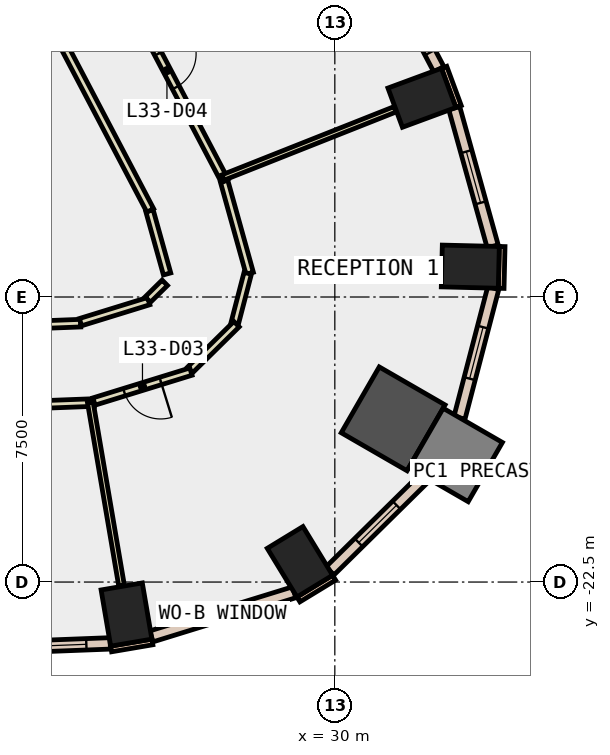
"""IFC4 building model, lengths in metres.
Left out: names, types, materials, properties, quantities, classifications, styles, units other than length and angle.
Written with IfcOpenShell. Run it as: python <this file> out.ifc"""

import sys

from ifc_helpers import new_model, si_unit, direction, frame, frame_2d, origin, origin_2d, place, context, subcontext, project, spatial, rectangle, extrude, element, fill, save


model = new_model("IFC4")
c1 = context("Model", 3, precision=1e-05, world=origin(), true_north=direction((0.0, 1.0)))
c2 = subcontext(c1, "Body", "Model", "MODEL_VIEW")
j1 = project(units=[si_unit("LENGTHUNIT", "METRE"), si_unit("PLANEANGLEUNIT", "RADIAN")], contexts=[c1])
p1 = place(None, origin())
s1 = spatial("IfcSite", under=j1, at=p1, CompositionType="ELEMENT")
p2 = place(p1, origin())
s2 = spatial("IfcBuilding", under=s1, at=p2, CompositionType="ELEMENT")
p3 = place(p2, frame((0.0, 0.0, 150.8)))
s3 = spatial("IfcBuildingStorey", under=s2, at=p3, CompositionType="ELEMENT", Elevation=150.8)
for number, where, z_axis, x_axis in (
    (1, (24.518, -23.355, -0.4), (0.0, 0.0, 1.0), (0.986, 0.168, 0.0)),
    (2, (29.082, -21.967, -0.4), (0.0, 0.0, 1.0), (0.854, 0.521, 0.0)),
):
    element("IfcColumn", number, at=place(p3, frame(where, z_axis=z_axis, x_axis=x_axis)), inside=s3, PredefinedType="COLUMN", context=c2, shape_type="SweptSolid", body=[
        extrude(rectangle(XDim=1.1, YDim=1.5, at=origin_2d()), origin(), (0.0, 0.0, 1.0), 4.2),
    ])
p4 = place(p3, frame((31.535, -18.206, -0.4), z_axis=(0.0, 0.0, 1.0), x_axis=(-0.866025403784, 0.5, 0.0)))
e3 = element("IfcColumn", 3, at=p4, inside=s3, PredefinedType="COLUMN", context=c2, shape_type="SweptSolid", body=[
    extrude(rectangle(XDim=2.0, YDim=2.0, at=origin_2d()), origin(), (0.0, 0.0, 1.0), 4.2),
])
for number, where, z_axis, x_axis in (
    (4, (33.565, -14.202, -0.4), (0.0, 0.0, 1.0), (0.024, 1.0, 0.0)),
    (5, (32.292, -9.758, -0.4), (0.0, 0.0, 1.0), (-0.347, 0.938, 0.0)),
):
    element("IfcColumn", number, at=place(p3, frame(where, z_axis=z_axis, x_axis=x_axis)), inside=s3, PredefinedType="COLUMN", context=c2, shape_type="SweptSolid", body=[
        extrude(rectangle(XDim=1.1, YDim=1.5, at=origin_2d()), origin(), (0.0, 0.0, 1.0), 4.2),
    ])
p5 = place(p3, frame((33.18, -19.156, -0.4), z_axis=(0.0, 0.0, 1.0), x_axis=(-0.866025403784, 0.5, 0.0)))
e6 = element("IfcColumn", 6, at=p5, inside=s3, PredefinedType="COLUMN", context=c2, shape_type="SweptSolid", body=[
    extrude(rectangle(XDim=1.8, YDim=1.8, at=origin_2d()), origin(), (0.0, 0.0, 1.0), 4.2),
])
p6 = place(p3, frame((33.256, -9.988, 0.0), z_axis=(0.0, 0.0, 1.0), x_axis=(-0.346425160624, 0.93807761304, 0.0)))
e7 = element("IfcWall", 7, at=p6, inside=s3, PredefinedType="STANDARD", context=c2, shape_type="SweptSolid", body=[
    extrude(rectangle(XDim=1.1, YDim=0.15, at=frame_2d((0.55, 0.0))), origin(), (0.0, 0.0, 1.0), 3.8),
])
p7 = place(p3, frame((24.114, -24.261, 0.0), z_axis=(0.0, 0.0, 1.0), x_axis=(0.985763338892, 0.168138751323, 0.0)))
e8 = element("IfcWall", 8, at=p7, inside=s3, PredefinedType="STANDARD", context=c2, shape_type="SweptSolid", body=[
    extrude(rectangle(XDim=1.101, YDim=0.15, at=frame_2d((0.55, 0.0))), origin(), (0.0, 0.0, 1.0), 3.8),
])
p8 = place(p3, frame((29.042, -22.957, 0.0), z_axis=(0.0, 0.0, 1.0), x_axis=(0.854005542721, 0.520263907071, 0.0)))
e9 = element("IfcWall", 9, at=p8, inside=s3, PredefinedType="STANDARD", context=c2, shape_type="SweptSolid", body=[
    extrude(rectangle(XDim=1.099, YDim=0.15, at=frame_2d((0.55, 0.0))), origin(), (0.0, 0.0, 1.0), 3.8),
])
p9 = place(p3, frame((34.377, -14.772, 0.0), z_axis=(0.0, 0.0, 1.0), x_axis=(0.023744690764, 0.999718055084, 0.0)))
e10 = element("IfcWall", 10, at=p9, inside=s3, PredefinedType="STANDARD", context=c2, shape_type="SweptSolid", body=[
    extrude(rectangle(XDim=1.1, YDim=0.15, at=frame_2d((0.55, 0.0))), origin(), (0.0, 0.0, 1.0), 3.8),
])
p10 = place(p3, frame((16.778, -24.395, 0.0), z_axis=(0.0, 0.0, 1.0), x_axis=(0.999262356942, 0.038402369711, 0.0)))
e11 = element("IfcWall", 11, at=p10, inside=s3, PredefinedType="STANDARD", context=c2, shape_type="SweptSolid", body=[
    extrude(rectangle(XDim=7.317, YDim=0.3, at=frame_2d((3.659, 0.0))), origin(), (0.0, 0.0, 1.0), 3.8),
])
p11 = place(p10, frame((0.629, 0.0, 0.9)))
e12 = element("IfcOpeningElement", 12, at=p11, cuts=e11, PredefinedType="OPENING", context=c2, shape_type="SweptSolid", body=[
    extrude(rectangle(XDim=2.4, YDim=2.6, at=frame_2d((1.2, 1.3))), frame((0.0, 0.16, 0.0), z_axis=(0.0, -1.0, 0.0), x_axis=(1.0, 0.0, 0.0)), (0.0, 0.0, 1.0), 0.32),
])
p12 = place(p10, frame((4.288, 0.0, 0.9)))
e13 = element("IfcOpeningElement", 13, at=p12, cuts=e11, PredefinedType="OPENING", context=c2, shape_type="SweptSolid", body=[
    extrude(rectangle(XDim=2.4, YDim=2.6, at=frame_2d((1.2, 1.3))), frame((0.0, 0.16, 0.0), z_axis=(0.0, -1.0, 0.0), x_axis=(1.0, 0.0, 0.0)), (0.0, 0.0, 1.0), 0.32),
])
p13 = place(p3, frame((25.173, -23.93, 0.0), z_axis=(0.0, 0.0, 1.0), x_axis=(0.955473661147, 0.295076401723, 0.0)))
e14 = element("IfcWall", 14, at=p13, inside=s3, PredefinedType="STANDARD", context=c2, shape_type="SweptSolid", body=[
    extrude(rectangle(XDim=3.931, YDim=0.3, at=frame_2d((1.965, 0.0))), origin(), (0.0, 0.0, 1.0), 3.8),
])
p14 = place(p13, frame((1.266, 0.0, 0.9)))
e15 = element("IfcOpeningElement", 15, at=p14, cuts=e14, PredefinedType="OPENING", context=c2, shape_type="SweptSolid", body=[
    extrude(rectangle(XDim=1.4, YDim=2.6, at=frame_2d((0.7, 1.3))), frame((0.0, 0.16, 0.0), z_axis=(0.0, -1.0, 0.0), x_axis=(1.0, 0.0, 0.0)), (0.0, 0.0, 1.0), 0.32),
])
p15 = place(p3, frame((29.872, -22.207, 0.0), z_axis=(0.0, 0.0, 1.0), x_axis=(0.712043314899, 0.702135540838, 0.0)))
e16 = element("IfcWall", 16, at=p15, inside=s3, PredefinedType="STANDARD", context=c2, shape_type="SweptSolid", body=[
    extrude(rectangle(XDim=3.524, YDim=0.3, at=frame_2d((1.762, 0.0))), origin(), (0.0, 0.0, 1.0), 3.8),
])
p16 = place(p15, frame((1.062, 0.0, 0.9)))
e17 = element("IfcOpeningElement", 17, at=p16, cuts=e16, PredefinedType="OPENING", context=c2, shape_type="SweptSolid", body=[
    extrude(rectangle(XDim=1.4, YDim=2.6, at=frame_2d((0.7, 1.3))), frame((0.0, 0.16, 0.0), z_axis=(0.0, -1.0, 0.0), x_axis=(1.0, 0.0, 0.0)), (0.0, 0.0, 1.0), 0.32),
])
p17 = place(p3, frame((33.28, -18.176, 0.0), z_axis=(0.0, 0.0, 1.0), x_axis=(0.252255494168, 0.967660666588, 0.0)))
e18 = element("IfcWall", 18, at=p17, inside=s3, PredefinedType="STANDARD", context=c2, shape_type="SweptSolid", body=[
    extrude(rectangle(XDim=3.524, YDim=0.3, at=frame_2d((1.762, 0.0))), origin(), (0.0, 0.0, 1.0), 3.8),
])
p18 = place(p17, frame((1.062, 0.0, 0.9)))
e19 = element("IfcOpeningElement", 19, at=p18, cuts=e18, PredefinedType="OPENING", context=c2, shape_type="SweptSolid", body=[
    extrude(rectangle(XDim=1.4, YDim=2.6, at=frame_2d((0.7, 1.3))), frame((0.0, 0.16, 0.0), z_axis=(0.0, -1.0, 0.0), x_axis=(1.0, 0.0, 0.0)), (0.0, 0.0, 1.0), 0.32),
])
p19 = place(p3, frame((34.154, -13.667, 0.0), z_axis=(0.0, 0.0, 1.0), x_axis=(-0.26799398221, 0.963420585985, 0.0)))
e20 = element("IfcWall", 20, at=p19, inside=s3, PredefinedType="STANDARD", context=c2, shape_type="SweptSolid", body=[
    extrude(rectangle(XDim=3.776, YDim=0.3, at=frame_2d((1.888, 0.0))), origin(), (0.0, 0.0, 1.0), 3.8),
])
p20 = place(p19, frame((1.188, 0.0, 0.9)))
e21 = element("IfcOpeningElement", 21, at=p20, cuts=e20, PredefinedType="OPENING", context=c2, shape_type="SweptSolid", body=[
    extrude(rectangle(XDim=1.4, YDim=2.6, at=frame_2d((0.7, 1.3))), frame((0.0, 0.16, 0.0), z_axis=(0.0, -1.0, 0.0), x_axis=(1.0, 0.0, 0.0)), (0.0, 0.0, 1.0), 0.32),
])
p21 = place(p3, frame((32.737, -9.008, 0.0), z_axis=(0.0, 0.0, 1.0), x_axis=(-0.465104650407, 0.885255705528, 0.0)))
e22 = element("IfcWall", 22, at=p21, inside=s3, PredefinedType="STANDARD", context=c2, shape_type="SweptSolid", body=[
    extrude(rectangle(XDim=5.99, YDim=0.3, at=frame_2d((2.995, 0.0))), origin(), (0.0, 0.0, 1.0), 3.8),
])
p22 = place(p21, frame((0.498, 0.0, 0.9)))
e23 = element("IfcOpeningElement", 23, at=p22, cuts=e22, PredefinedType="OPENING", context=c2, shape_type="SweptSolid", body=[
    extrude(rectangle(XDim=2.0, YDim=2.6, at=frame_2d((1.0, 1.3))), frame((0.0, 0.16, 0.0), z_axis=(0.0, -1.0, 0.0), x_axis=(1.0, 0.0, 0.0)), (0.0, 0.0, 1.0), 0.32),
])
p23 = place(p21, frame((3.493, 0.0, 0.9)))
e24 = element("IfcOpeningElement", 24, at=p23, cuts=e22, PredefinedType="OPENING", context=c2, shape_type="SweptSolid", body=[
    extrude(rectangle(XDim=2.0, YDim=2.6, at=frame_2d((1.0, 1.3))), frame((0.0, 0.16, 0.0), z_axis=(0.0, -1.0, 0.0), x_axis=(1.0, 0.0, 0.0)), (0.0, 0.0, 1.0), 0.32),
])
p24 = place(p3, frame((15.972, -15.97, 0.0), z_axis=(0.0, 0.0, 1.0), x_axis=(0.999262695969, 0.038393546916, 0.0)))
e25 = element("IfcWall", 25, at=p24, inside=s3, PredefinedType="PARTITIONING", context=c2, shape_type="SweptSolid", body=[
    extrude(rectangle(XDim=7.344, YDim=0.2, at=frame_2d((3.672, 0.0))), origin(), (0.0, 0.0, 1.0), 3.8),
])
p25 = place(p3, frame((23.307, -15.662, 0.0), z_axis=(0.0, 0.0, 1.0), x_axis=(0.955548436851, 0.294834164966, 0.0)))
e26 = element("IfcWall", 26, at=p25, inside=s3, PredefinedType="PARTITIONING", context=c2, shape_type="SweptSolid", body=[
    extrude(rectangle(XDim=1.88, YDim=0.2, at=frame_2d((0.94, 0.0))), origin(), (0.0, 0.0, 1.0), 3.8),
])
p26 = place(p3, frame((25.079, -15.067, 0.0), z_axis=(0.0, 0.0, 1.0), x_axis=(0.711758647644, 0.702424108003, 0.0)))
e27 = element("IfcWall", 27, at=p26, inside=s3, PredefinedType="PARTITIONING", context=c2, shape_type="SweptSolid", body=[
    extrude(rectangle(XDim=0.628, YDim=0.2, at=frame_2d((0.314, 0.0))), origin(), (0.0, 0.0, 1.0), 3.8),
])
p27 = place(p3, frame((25.586, -14.393, 0.0), z_axis=(0.0, 0.0, 1.0), x_axis=(-0.268139825244, 0.963380005044, 0.0)))
e28 = element("IfcWall", 28, at=p27, inside=s3, PredefinedType="PARTITIONING", context=c2, shape_type="SweptSolid", body=[
    extrude(rectangle(XDim=1.726, YDim=0.2, at=frame_2d((0.863, 0.0))), origin(), (0.0, 0.0, 1.0), 3.8),
])
p28 = place(p3, frame((25.143, -12.722, 0.0), z_axis=(0.0, 0.0, 1.0), x_axis=(-0.465089990515, 0.885263407536, 0.0)))
e29 = element("IfcWall", 29, at=p28, inside=s3, PredefinedType="PARTITIONING", context=c2, shape_type="SweptSolid", body=[
    extrude(rectangle(XDim=6.24, YDim=0.2, at=frame_2d((3.12, 0.0))), origin(), (0.0, 0.0, 1.0), 3.8),
])
p29 = place(p3, frame((23.667, -17.776, 0.0), z_axis=(0.0, 0.0, 1.0), x_axis=(-0.999264080977, -0.038357482575, 0.0)))
e30 = element("IfcWall", 30, at=p29, inside=s3, PredefinedType="PARTITIONING", context=c2, shape_type="SweptSolid", body=[
    extrude(rectangle(XDim=7.562, YDim=0.2, at=frame_2d((3.781, 0.0))), origin(), (0.0, 0.0, 1.0), 3.8),
])
p30 = place(p29, frame((3.356, 0.0, 0.0)))
e31 = element("IfcOpeningElement", 31, at=p30, cuts=e30, PredefinedType="OPENING", context=c2, shape_type="SweptSolid", body=[
    extrude(rectangle(XDim=1.0, YDim=2.1, at=frame_2d((0.5, 1.05))), frame((0.0, 0.11, 0.0), z_axis=(0.0, -1.0, 0.0), x_axis=(1.0, 0.0, 0.0)), (0.0, 0.0, 1.0), 0.22),
])
p31 = place(p3, frame((27.086, -11.952, 0.0), z_axis=(0.0, 0.0, 1.0), x_axis=(0.267909096687, -0.963444194498, 0.0)))
e32 = element("IfcWall", 32, at=p31, inside=s3, PredefinedType="PARTITIONING", context=c2, shape_type="SweptSolid", body=[
    extrude(rectangle(XDim=2.516, YDim=0.2, at=frame_2d((1.258, 0.0))), origin(), (0.0, 0.0, 1.0), 3.8),
])
p32 = place(p3, frame((27.708, -14.376, 0.0), z_axis=(0.0, 0.0, 1.0), x_axis=(-0.25159336549, -0.967833032316, 0.0)))
e33 = element("IfcWall", 33, at=p32, inside=s3, PredefinedType="PARTITIONING", context=c2, shape_type="SweptSolid", body=[
    extrude(rectangle(XDim=1.356, YDim=0.2, at=frame_2d((0.678, 0.0))), origin(), (0.0, 0.0, 1.0), 3.8),
])
p33 = place(p3, frame((27.413, -15.715, 0.0), z_axis=(0.0, 0.0, 1.0), x_axis=(-0.712339678389, -0.701834868465, 0.0)))
e34 = element("IfcWall", 34, at=p33, inside=s3, PredefinedType="PARTITIONING", context=c2, shape_type="SweptSolid", body=[
    extrude(rectangle(XDim=1.72, YDim=0.2, at=frame_2d((0.86, 0.0))), origin(), (0.0, 0.0, 1.0), 3.8),
])
p34 = place(p3, frame((26.213, -16.963, 0.0), z_axis=(0.0, 0.0, 1.0), x_axis=(-0.955509582123, -0.294960062501, 0.0)))
e35 = element("IfcWall", 35, at=p34, inside=s3, PredefinedType="PARTITIONING", context=c2, shape_type="SweptSolid", body=[
    extrude(rectangle(XDim=2.668, YDim=0.2, at=frame_2d((1.334, 0.0))), origin(), (0.0, 0.0, 1.0), 3.8),
])
p35 = place(p34, frame((0.834, 0.0, 0.0)))
e36 = element("IfcOpeningElement", 36, at=p35, cuts=e35, PredefinedType="OPENING", context=c2, shape_type="SweptSolid", body=[
    extrude(rectangle(XDim=1.0, YDim=2.1, at=frame_2d((0.5, 1.05))), frame((0.0, 0.11, 0.0), z_axis=(0.0, -1.0, 0.0), x_axis=(1.0, 0.0, 0.0)), (0.0, 0.0, 1.0), 0.22),
])
p36 = place(p3, frame((24.059, -6.143, 0.0), z_axis=(0.0, 0.0, 1.0), x_axis=(0.464993808059, -0.885313932154, 0.0)))
e37 = element("IfcWall", 37, at=p36, inside=s3, PredefinedType="PARTITIONING", context=c2, shape_type="SweptSolid", body=[
    extrude(rectangle(XDim=6.552, YDim=0.2, at=frame_2d((3.276, 0.0))), origin(), (0.0, 0.0, 1.0), 3.8),
])
p37 = place(p36, frame((2.776, 0.0, 0.0)))
e38 = element("IfcOpeningElement", 38, at=p37, cuts=e37, PredefinedType="OPENING", context=c2, shape_type="SweptSolid", body=[
    extrude(rectangle(XDim=1.0, YDim=2.1, at=frame_2d((0.5, 1.05))), frame((0.0, 0.11, 0.0), z_axis=(0.0, -1.0, 0.0), x_axis=(1.0, 0.0, 0.0)), (0.0, 0.0, 1.0), 0.22),
])
p38 = place(p3, frame((23.567, -17.779, 0.0), z_axis=(0.0, 0.0, 1.0), x_axis=(0.168027663896, -0.985782280306, 0.0)))
e39 = element("IfcWall", 39, at=p38, inside=s3, PredefinedType="PARTITIONING", context=c2, shape_type="SweptSolid", body=[
    extrude(rectangle(XDim=4.886, YDim=0.15, at=frame_2d((2.443, 0.0))), origin(), (0.0, 0.0, 1.0), 3.8),
])
p39 = place(p3, frame((27.059, -11.855, 0.0), z_axis=(0.0, 0.0, 1.0), x_axis=(0.92964843089, 0.368447818481, 0.0)))
e40 = element("IfcWall", 40, at=p39, inside=s3, PredefinedType="PARTITIONING", context=c2, shape_type="SweptSolid", body=[
    extrude(rectangle(XDim=4.866, YDim=0.15, at=frame_2d((2.433, 0.0))), origin(), (0.0, 0.0, 1.0), 3.8),
])
p40 = place(p12, origin())
e41 = element("IfcWindow", 41, at=p40, inside=s3, PartitioningType="SINGLE_PANEL", PredefinedType="WINDOW", context=c2, shape_type="SweptSolid", body=[
    extrude(rectangle(XDim=2.4, YDim=2.6, at=frame_2d((1.2, 1.3))), frame((0.0, 0.03, 0.0), z_axis=(0.0, -1.0, 0.0), x_axis=(1.0, 0.0, 0.0)), (0.0, 0.0, 1.0), 0.06),
])
fill(e13, e41)
p41 = place(p14, origin())
e42 = element("IfcWindow", 42, at=p41, inside=s3, PartitioningType="SINGLE_PANEL", PredefinedType="WINDOW", context=c2, shape_type="SweptSolid", body=[
    extrude(rectangle(XDim=1.4, YDim=2.6, at=frame_2d((0.7, 1.3))), frame((0.0, 0.03, 0.0), z_axis=(0.0, -1.0, 0.0), x_axis=(1.0, 0.0, 0.0)), (0.0, 0.0, 1.0), 0.06),
])
fill(e15, e42)
p42 = place(p16, origin())
e43 = element("IfcWindow", 43, at=p42, inside=s3, PartitioningType="SINGLE_PANEL", PredefinedType="WINDOW", context=c2, shape_type="SweptSolid", body=[
    extrude(rectangle(XDim=1.4, YDim=2.6, at=frame_2d((0.7, 1.3))), frame((0.0, 0.03, 0.0), z_axis=(0.0, -1.0, 0.0), x_axis=(1.0, 0.0, 0.0)), (0.0, 0.0, 1.0), 0.06),
])
fill(e17, e43)
p43 = place(p18, origin())
e44 = element("IfcWindow", 44, at=p43, inside=s3, PartitioningType="SINGLE_PANEL", PredefinedType="WINDOW", context=c2, shape_type="SweptSolid", body=[
    extrude(rectangle(XDim=1.4, YDim=2.6, at=frame_2d((0.7, 1.3))), frame((0.0, 0.03, 0.0), z_axis=(0.0, -1.0, 0.0), x_axis=(1.0, 0.0, 0.0)), (0.0, 0.0, 1.0), 0.06),
])
fill(e19, e44)
p44 = place(p20, origin())
e45 = element("IfcWindow", 45, at=p44, inside=s3, PartitioningType="SINGLE_PANEL", PredefinedType="WINDOW", context=c2, shape_type="SweptSolid", body=[
    extrude(rectangle(XDim=1.4, YDim=2.6, at=frame_2d((0.7, 1.3))), frame((0.0, 0.03, 0.0), z_axis=(0.0, -1.0, 0.0), x_axis=(1.0, 0.0, 0.0)), (0.0, 0.0, 1.0), 0.06),
])
fill(e21, e45)
p45 = place(p22, origin())
e46 = element("IfcWindow", 46, at=p45, inside=s3, PartitioningType="SINGLE_PANEL", PredefinedType="WINDOW", context=c2, shape_type="SweptSolid", body=[
    extrude(rectangle(XDim=2.0, YDim=2.6, at=frame_2d((1.0, 1.3))), frame((0.0, 0.03, 0.0), z_axis=(0.0, -1.0, 0.0), x_axis=(1.0, 0.0, 0.0)), (0.0, 0.0, 1.0), 0.06),
])
fill(e23, e46)
p46 = place(p35, origin())
e47 = element("IfcDoor", 47, at=p46, inside=s3, OperationType="SINGLE_SWING_LEFT", PredefinedType="DOOR", context=c2, shape_type="SweptSolid", body=[
    extrude(rectangle(XDim=1.0, YDim=2.1, at=frame_2d((0.5, 1.05))), frame((0.0, 0.025, 0.0), z_axis=(0.0, -1.0, 0.0), x_axis=(1.0, 0.0, 0.0)), (0.0, 0.0, 1.0), 0.05),
])
fill(e36, e47)
p47 = place(p37, origin())
e48 = element("IfcDoor", 48, at=p47, inside=s3, OperationType="SINGLE_SWING_LEFT", PredefinedType="DOOR", context=c2, shape_type="SweptSolid", body=[
    extrude(rectangle(XDim=1.0, YDim=2.1, at=frame_2d((0.5, 1.05))), frame((0.0, 0.025, 0.0), z_axis=(0.0, -1.0, 0.0), x_axis=(1.0, 0.0, 0.0)), (0.0, 0.0, 1.0), 0.05),
])
fill(e38, e48)
save(model, sys.argv[1])
